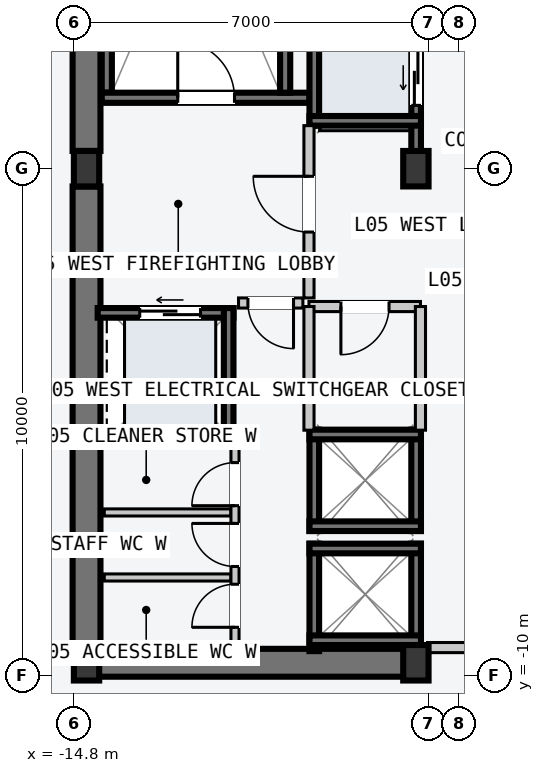
"""IFC4 building model, lengths in metres.
Left out: names, types, materials, properties, quantities, classifications, styles, units other than length and angle.
Written with IfcOpenShell. Run it as: python <this file> out.ifc"""

import sys

from ifc_helpers import new_model, si_unit, direction, frame, frame_2d, origin, origin_2d, place, context, subcontext, project, spatial, rectangle, i_section, extrude, element, fill, save


model = new_model("IFC4")
c1 = context("Model", 3, precision=1e-05, world=origin(), true_north=direction((0.0, 1.0)))
c2 = subcontext(c1, "Body", "Model", "MODEL_VIEW")
j1 = project(units=[si_unit("LENGTHUNIT", "METRE"), si_unit("PLANEANGLEUNIT", "RADIAN")], contexts=[c1])
p1 = place(None, origin())
s1 = spatial("IfcSite", under=j1, at=p1, CompositionType="ELEMENT")
p2 = place(p1, origin())
s2 = spatial("IfcBuilding", under=s1, at=p2, CompositionType="ELEMENT")
p3 = place(p2, frame((0.0, 0.0, 24.0)))
s3 = spatial("IfcBuildingStorey", under=s2, at=p3, CompositionType="ELEMENT", Elevation=24.0)
p4 = place(p3, frame((-14.53, -9.75, -0.2), z_axis=(0.0, 0.0, 1.0), x_axis=(1.0, 0.0, 0.0)))
e1 = element("IfcWall", 1, at=p4, inside=s3, PredefinedType="SHEAR", context=c2, shape_type="SweptSolid", body=[
    extrude(rectangle(XDim=6.46, YDim=0.55, at=frame_2d((3.23, 0.0))), origin(), (0.0, 0.0, 1.0), 3.6),
])
for number, where, z_axis, x_axis in (
    (2, (-14.55, -9.4, -0.2), (0.0, 0.0, 1.0), (0.0, 1.0, 0.0)),
    (3, (-14.55, 0.35, -0.2), (0.0, 0.0, 1.0), (0.0, 1.0, 0.0)),
):
    element("IfcWall", number, at=place(p3, frame(where, z_axis=z_axis, x_axis=x_axis)), inside=s3, PredefinedType="SHEAR", context=c2, shape_type="SweptSolid", body=[
        extrude(rectangle(XDim=9.05, YDim=0.55, at=frame_2d((4.525, 0.0))), origin(), (0.0, 0.0, 1.0), 3.6),
    ])
p5 = place(p3, frame((-14.15, 1.5, -0.2), z_axis=(0.0, 0.0, 1.0), x_axis=(0.0, 1.0, 0.0)))
e4 = element("IfcWall", 4, at=p5, inside=s3, PredefinedType="SOLIDWALL", context=c2, shape_type="SweptSolid", body=[
    extrude(rectangle(XDim=7.8, YDim=0.2, at=frame_2d((3.9, 0.0))), origin(), (0.0, 0.0, 1.0), 3.6),
])
p6 = place(p3, frame((-14.25, 1.4, -0.2), z_axis=(0.0, 0.0, 1.0), x_axis=(1.0, 0.0, 0.0)))
e5 = element("IfcWall", 5, at=p6, inside=s3, PredefinedType="SOLIDWALL", context=c2, shape_type="SweptSolid", body=[
    extrude(rectangle(XDim=4.1, YDim=0.2, at=frame_2d((2.05, 0.0))), origin(), (0.0, 0.0, 1.0), 3.6),
])
p7 = place(p6, frame((1.5, 0.0, 0.2)))
e6 = element("IfcOpeningElement", 6, at=p7, cuts=e5, PredefinedType="OPENING", context=c2, shape_type="SweptSolid", body=[
    extrude(rectangle(XDim=1.12, YDim=2.18, at=frame_2d((0.56, 1.09))), frame((0.0, 0.11, 0.0), z_axis=(0.0, -1.0, 0.0), x_axis=(1.0, 0.0, 0.0)), (0.0, 0.0, 1.0), 0.22),
])
p8 = place(p3, frame((-10.63, 1.5, -0.2), z_axis=(0.0, 0.0, 1.0), x_axis=(0.0, 1.0, 0.0)))
e7 = element("IfcWall", 7, at=p8, inside=s3, PredefinedType="SOLIDWALL", context=c2, shape_type="SweptSolid", body=[
    extrude(rectangle(XDim=7.8, YDim=0.2, at=frame_2d((3.9, 0.0))), origin(), (0.0, 0.0, 1.0), 3.6),
])
for number, where, z_axis, x_axis in (
    (8, (-14.55, -9.75, 0.0), (0.0, 0.0, 1.0), (1.0, 0.0, 0.0)),
    (9, (-14.55, 0.0, 0.0), (0.0, 0.0, 1.0), (1.0, 0.0, 0.0)),
    (10, (-8.05, -9.75, 0.0), (0.0, 0.0, 1.0), (1.0, 0.0, 0.0)),
    (11, (-8.05, 0.0, 0.0), (0.0, 0.0, 1.0), (1.0, 0.0, 0.0)),
):
    element("IfcColumn", number, at=place(p3, frame(where, z_axis=z_axis, x_axis=x_axis)), inside=s3, PredefinedType="COLUMN", context=c2, shape_type="SweptSolid", body=[
        extrude(i_section(OverallWidth=0.5, OverallDepth=0.7, WebThickness=0.028, FlangeThickness=0.045, at=origin_2d()), origin(), (0.0, 0.0, 1.0), 3.6),
    ])
p9 = place(p3, frame((-8.045, 0.21, -0.2), z_axis=(0.0, 0.0, 1.0), x_axis=(0.0, 1.0, 0.0)))
e12 = element("IfcWall", 12, at=p9, inside=s3, PredefinedType="SOLIDWALL", context=c2, shape_type="SweptSolid", body=[
    extrude(rectangle(XDim=2.54, YDim=0.19, at=frame_2d((1.27, 0.0))), origin(), (0.0, 0.0, 1.0), 3.6),
])
p10 = place(p9, frame((1.04, 0.0, 0.2)))
e13 = element("IfcOpeningElement", 13, at=p10, cuts=e12, PredefinedType="OPENING", context=c2, shape_type="SweptSolid", body=[
    extrude(rectangle(XDim=1.1, YDim=2.2, at=frame_2d((0.55, 1.1))), frame((0.0, 0.105, 0.0), z_axis=(0.0, -1.0, 0.0), x_axis=(1.0, 0.0, 0.0)), (0.0, 0.0, 1.0), 0.21),
])
p11 = place(p3, frame((-10.055, 0.85, -0.2), z_axis=(0.0, 0.0, 1.0), x_axis=(0.0, 1.0, 0.0)))
e14 = element("IfcWall", 14, at=p11, inside=s3, PredefinedType="SOLIDWALL", context=c2, shape_type="SweptSolid", body=[
    extrude(rectangle(XDim=1.9, YDim=0.19, at=frame_2d((0.95, 0.0))), origin(), (0.0, 0.0, 1.0), 3.6),
])
p12 = place(p3, frame((-10.15, 0.945, -0.2), z_axis=(0.0, 0.0, 1.0), x_axis=(1.0, 0.0, 0.0)))
e15 = element("IfcWall", 15, at=p12, inside=s3, PredefinedType="SOLIDWALL", context=c2, shape_type="SweptSolid", body=[
    extrude(rectangle(XDim=2.2, YDim=0.19, at=frame_2d((1.1, 0.0))), origin(), (0.0, 0.0, 1.0), 3.6),
])
for number, where, z_axis, x_axis in (
    (16, (-8.045, -9.52, -0.2), (0.0, 0.0, 1.0), (0.0, 1.0, 0.0)),
    (17, (-10.055, -9.52, -0.2), (0.0, 0.0, 1.0), (0.0, 1.0, 0.0)),
):
    element("IfcWall", number, at=place(p3, frame(where, z_axis=z_axis, x_axis=x_axis)), inside=s3, PredefinedType="SOLIDWALL", context=c2, shape_type="SweptSolid", body=[
        extrude(rectangle(XDim=2.12, YDim=0.19, at=frame_2d((1.06, 0.0))), origin(), (0.0, 0.0, 1.0), 3.6),
    ])
for number, where, z_axis, x_axis in (
    (18, (-10.15, -7.495, -0.2), (0.0, 0.0, 1.0), (1.0, 0.0, 0.0)),
    (19, (-10.15, -9.305, -0.2), (0.0, 0.0, 1.0), (1.0, 0.0, 0.0)),
):
    element("IfcWall", number, at=place(p3, frame(where, z_axis=z_axis, x_axis=x_axis)), inside=s3, PredefinedType="SOLIDWALL", context=c2, shape_type="SweptSolid", body=[
        extrude(rectangle(XDim=2.2, YDim=0.19, at=frame_2d((1.1, 0.0))), origin(), (0.0, 0.0, 1.0), 3.6),
    ])
for number, where, z_axis, x_axis in (
    (20, (-8.045, -7.15, -0.2), (0.0, 0.0, 1.0), (0.0, 1.0, 0.0)),
    (21, (-10.055, -7.15, -0.2), (0.0, 0.0, 1.0), (0.0, 1.0, 0.0)),
):
    element("IfcWall", number, at=place(p3, frame(where, z_axis=z_axis, x_axis=x_axis)), inside=s3, PredefinedType="SOLIDWALL", context=c2, shape_type="SweptSolid", body=[
        extrude(rectangle(XDim=2.0, YDim=0.19, at=frame_2d((1.0, 0.0))), origin(), (0.0, 0.0, 1.0), 3.6),
    ])
for number, where, z_axis, x_axis in (
    (22, (-10.15, -5.245, -0.2), (0.0, 0.0, 1.0), (1.0, 0.0, 0.0)),
    (23, (-10.15, -7.055, -0.2), (0.0, 0.0, 1.0), (1.0, 0.0, 0.0)),
):
    element("IfcWall", number, at=place(p3, frame(where, z_axis=z_axis, x_axis=x_axis)), inside=s3, PredefinedType="SOLIDWALL", context=c2, shape_type="SweptSolid", body=[
        extrude(rectangle(XDim=2.2, YDim=0.19, at=frame_2d((1.1, 0.0))), origin(), (0.0, 0.0, 1.0), 3.6),
    ])
p13 = place(p3, frame((-14.33, -2.845, -0.2), z_axis=(0.0, 0.0, 1.0), x_axis=(1.0, 0.0, 0.0)))
e24 = element("IfcWall", 24, at=p13, inside=s3, PredefinedType="SOLIDWALL", context=c2, shape_type="SweptSolid", body=[
    extrude(rectangle(XDim=2.68, YDim=0.19, at=frame_2d((1.34, 0.0))), origin(), (0.0, 0.0, 1.0), 3.6),
])
p14 = place(p13, frame((0.83, 0.0, 0.2)))
e25 = element("IfcOpeningElement", 25, at=p14, cuts=e24, PredefinedType="OPENING", context=c2, shape_type="SweptSolid", body=[
    extrude(rectangle(XDim=1.2, YDim=2.2, at=frame_2d((0.6, 1.1))), frame((0.0, 0.105, 0.0), z_axis=(0.0, -1.0, 0.0), x_axis=(1.0, 0.0, 0.0)), (0.0, 0.0, 1.0), 0.21),
])
p15 = place(p3, frame((-14.33, -5.255, -0.2), z_axis=(0.0, 0.0, 1.0), x_axis=(1.0, 0.0, 0.0)))
e26 = element("IfcWall", 26, at=p15, inside=s3, PredefinedType="SOLIDWALL", context=c2, shape_type="SweptSolid", body=[
    extrude(rectangle(XDim=2.68, YDim=0.19, at=frame_2d((1.34, 0.0))), origin(), (0.0, 0.0, 1.0), 3.6),
])
p16 = place(p3, frame((-11.745, -5.35, -0.2), z_axis=(0.0, 0.0, 1.0), x_axis=(0.0, 1.0, 0.0)))
e27 = element("IfcWall", 27, at=p16, inside=s3, PredefinedType="SOLIDWALL", context=c2, shape_type="SweptSolid", body=[
    extrude(rectangle(XDim=2.6, YDim=0.19, at=frame_2d((1.3, 0.0))), origin(), (0.0, 0.0, 1.0), 3.6),
])
p17 = place(p3, frame((-6.02, -9.45, 0.0), z_axis=(0.0, 0.0, 1.0), x_axis=(-1.0, 0.0, 0.0)))
e28 = element("IfcWall", 28, at=p17, inside=s3, PredefinedType="PARTITIONING", context=c2, shape_type="SweptSolid", body=[
    extrude(rectangle(XDim=1.8, YDim=0.2, at=frame_2d((0.9, 0.0))), origin(), (0.0, 0.0, 1.0), 3.4),
])
p18 = place(p3, frame((-10.16, -2.55, 0.0), z_axis=(0.0, 0.0, 1.0), x_axis=(0.0, 1.0, 0.0)))
e29 = element("IfcWall", 29, at=p18, inside=s3, PredefinedType="PARTITIONING", context=c2, shape_type="SweptSolid", body=[
    extrude(rectangle(XDim=3.4, YDim=0.2, at=frame_2d((1.7, 0.0))), origin(), (0.0, 0.0, 1.0), 3.4),
])
p19 = place(p18, frame((1.3, 0.0, 0.0)))
e30 = element("IfcOpeningElement", 30, at=p19, cuts=e29, PredefinedType="OPENING", context=c2, shape_type="SweptSolid", body=[
    extrude(rectangle(XDim=1.1, YDim=2.15, at=frame_2d((0.55, 1.075))), frame((0.0, 0.11, 0.0), z_axis=(0.0, -1.0, 0.0), x_axis=(1.0, 0.0, 0.0)), (0.0, 0.0, 1.0), 0.22),
])
p20 = place(p3, frame((-10.28, -2.65, 0.0), z_axis=(0.0, 0.0, 1.0), x_axis=(-1.0, 0.0, 0.0)))
e31 = element("IfcWall", 31, at=p20, inside=s3, PredefinedType="PARTITIONING", context=c2, shape_type="SweptSolid", body=[
    extrude(rectangle(XDim=1.27, YDim=0.2, at=frame_2d((0.635, 0.0))), origin(), (0.0, 0.0, 1.0), 3.4),
])
p21 = place(p20, frame((0.185, 0.0, 0.0)))
e32 = element("IfcOpeningElement", 32, at=p21, cuts=e31, PredefinedType="OPENING", context=c2, shape_type="SweptSolid", body=[
    extrude(rectangle(XDim=0.9, YDim=2.15, at=frame_2d((0.45, 1.075))), frame((0.0, 0.11, 0.0), z_axis=(0.0, -1.0, 0.0), x_axis=(1.0, 0.0, 0.0)), (0.0, 0.0, 1.0), 0.22),
])
p22 = place(p3, frame((-7.96, -2.72, 0.0), z_axis=(0.0, 0.0, 1.0), x_axis=(-1.0, 0.0, 0.0)))
e33 = element("IfcWall", 33, at=p22, inside=s3, PredefinedType="PARTITIONING", context=c2, shape_type="SweptSolid", body=[
    extrude(rectangle(XDim=2.2, YDim=0.2, at=frame_2d((1.1, 0.0))), origin(), (0.0, 0.0, 1.0), 3.4),
])
p23 = place(p22, frame((0.62, 0.0, 0.0)))
e34 = element("IfcOpeningElement", 34, at=p23, cuts=e33, PredefinedType="OPENING", context=c2, shape_type="SweptSolid", body=[
    extrude(rectangle(XDim=0.95, YDim=2.1, at=frame_2d((0.475, 1.05))), frame((0.0, 0.11, 0.0), z_axis=(0.0, -1.0, 0.0), x_axis=(1.0, 0.0, 0.0)), (0.0, 0.0, 1.0), 0.22),
])
for number, where, z_axis, x_axis in (
    (35, (-7.96, -5.16, 0.0), (0.0, 0.0, 1.0), (0.0, 1.0, 0.0)),
    (36, (-10.16, -5.16, 0.0), (0.0, 0.0, 1.0), (0.0, 1.0, 0.0)),
):
    element("IfcWall", number, at=place(p3, frame(where, z_axis=z_axis, x_axis=x_axis)), inside=s3, PredefinedType="PARTITIONING", context=c2, shape_type="SweptSolid", body=[
        extrude(rectangle(XDim=2.44, YDim=0.2, at=frame_2d((1.22, 0.0))), origin(), (0.0, 0.0, 1.0), 3.4),
    ])
for number, where, z_axis, x_axis in (
    (37, (-11.7, -8.067, 0.0), (0.0, 0.0, 1.0), (-1.0, 0.0, 0.0)),
    (38, (-11.7, -6.783, 0.0), (0.0, 0.0, 1.0), (-1.0, 0.0, 0.0)),
):
    element("IfcWall", number, at=place(p3, frame(where, z_axis=z_axis, x_axis=x_axis)), inside=s3, PredefinedType="PARTITIONING", context=c2, shape_type="SweptSolid", body=[
        extrude(rectangle(XDim=2.5, YDim=0.14, at=frame_2d((1.25, 0.0))), origin(), (0.0, 0.0, 1.0), 3.4),
    ])
p24 = place(p3, frame((-11.62, -9.35, 0.0), z_axis=(0.0, 0.0, 1.0), x_axis=(0.0, 1.0, 0.0)))
e39 = element("IfcWall", 39, at=p24, inside=s3, PredefinedType="PARTITIONING", context=c2, shape_type="SweptSolid", body=[
    extrude(rectangle(XDim=3.85, YDim=0.16, at=frame_2d((1.925, 0.0))), origin(), (0.0, 0.0, 1.0), 3.4),
])
p25 = place(p24, frame((0.3, 0.0, 0.0)))
e40 = element("IfcOpeningElement", 40, at=p25, cuts=e39, PredefinedType="OPENING", context=c2, shape_type="SweptSolid", body=[
    extrude(rectangle(XDim=0.85, YDim=2.12, at=frame_2d((0.425, 1.06))), frame((0.0, 0.09, 0.0), z_axis=(0.0, -1.0, 0.0), x_axis=(1.0, 0.0, 0.0)), (0.0, 0.0, 1.0), 0.18),
])
p26 = place(p24, frame((1.5, 0.0, 0.0)))
e41 = element("IfcOpeningElement", 41, at=p26, cuts=e39, PredefinedType="OPENING", context=c2, shape_type="SweptSolid", body=[
    extrude(rectangle(XDim=0.85, YDim=2.12, at=frame_2d((0.425, 1.06))), frame((0.0, 0.09, 0.0), z_axis=(0.0, -1.0, 0.0), x_axis=(1.0, 0.0, 0.0)), (0.0, 0.0, 1.0), 0.18),
])
p27 = place(p24, frame((2.7, 0.0, 0.0)))
e42 = element("IfcOpeningElement", 42, at=p27, cuts=e39, PredefinedType="OPENING", context=c2, shape_type="SweptSolid", body=[
    extrude(rectangle(XDim=0.85, YDim=2.12, at=frame_2d((0.425, 1.06))), frame((0.0, 0.09, 0.0), z_axis=(0.0, -1.0, 0.0), x_axis=(1.0, 0.0, 0.0)), (0.0, 0.0, 1.0), 0.18),
])
p28 = place(p7, origin())
e43 = element("IfcDoor", 43, at=p28, inside=s3, OperationType="SINGLE_SWING_LEFT", PredefinedType="DOOR", context=c2, shape_type="SweptSolid", body=[
    extrude(rectangle(XDim=1.12, YDim=2.18, at=frame_2d((0.56, 1.09))), frame((0.0, 0.025, 0.0), z_axis=(0.0, -1.0, 0.0), x_axis=(1.0, 0.0, 0.0)), (0.0, 0.0, 1.0), 0.05),
])
fill(e6, e43)
p29 = place(p10, origin())
e44 = element("IfcDoor", 44, at=p29, inside=s3, OperationType="SLIDING_TO_LEFT", PredefinedType="DOOR", context=c2, shape_type="SweptSolid", body=[
    extrude(rectangle(XDim=1.1, YDim=2.2, at=frame_2d((0.55, 1.1))), frame((0.0, 0.025, 0.0), z_axis=(0.0, -1.0, 0.0), x_axis=(1.0, 0.0, 0.0)), (0.0, 0.0, 1.0), 0.05),
])
fill(e13, e44)
p30 = place(p14, origin())
e45 = element("IfcDoor", 45, at=p30, inside=s3, OperationType="SLIDING_TO_LEFT", PredefinedType="DOOR", context=c2, shape_type="SweptSolid", body=[
    extrude(rectangle(XDim=1.2, YDim=2.2, at=frame_2d((0.6, 1.1))), frame((0.0, 0.025, 0.0), z_axis=(0.0, -1.0, 0.0), x_axis=(1.0, 0.0, 0.0)), (0.0, 0.0, 1.0), 0.05),
])
fill(e25, e45)
p31 = place(p19, origin())
e46 = element("IfcDoor", 46, at=p31, inside=s3, OperationType="SINGLE_SWING_RIGHT", PredefinedType="DOOR", context=c2, shape_type="SweptSolid", body=[
    extrude(rectangle(XDim=1.1, YDim=2.15, at=frame_2d((0.55, 1.075))), frame((0.0, 0.025, 0.0), z_axis=(0.0, -1.0, 0.0), x_axis=(1.0, 0.0, 0.0)), (0.0, 0.0, 1.0), 0.05),
])
fill(e30, e46)
p32 = place(p21, origin())
e47 = element("IfcDoor", 47, at=p32, inside=s3, OperationType="SINGLE_SWING_LEFT", PredefinedType="DOOR", context=c2, shape_type="SweptSolid", body=[
    extrude(rectangle(XDim=0.9, YDim=2.15, at=frame_2d((0.45, 1.075))), frame((0.0, 0.025, 0.0), z_axis=(0.0, -1.0, 0.0), x_axis=(1.0, 0.0, 0.0)), (0.0, 0.0, 1.0), 0.05),
])
fill(e32, e47)
p33 = place(p23, origin())
e48 = element("IfcDoor", 48, at=p33, inside=s3, OperationType="SINGLE_SWING_RIGHT", PredefinedType="DOOR", context=c2, shape_type="SweptSolid", body=[
    extrude(rectangle(XDim=0.95, YDim=2.1, at=frame_2d((0.475, 1.05))), frame((0.0, 0.025, 0.0), z_axis=(0.0, -1.0, 0.0), x_axis=(1.0, 0.0, 0.0)), (0.0, 0.0, 1.0), 0.05),
])
fill(e34, e48)
p34 = place(p25, origin())
e49 = element("IfcDoor", 49, at=p34, inside=s3, OperationType="SINGLE_SWING_LEFT", PredefinedType="DOOR", context=c2, shape_type="SweptSolid", body=[
    extrude(rectangle(XDim=0.85, YDim=2.12, at=frame_2d((0.425, 1.06))), frame((0.0, 0.025, 0.0), z_axis=(0.0, -1.0, 0.0), x_axis=(1.0, 0.0, 0.0)), (0.0, 0.0, 1.0), 0.05),
])
fill(e40, e49)
p35 = place(p26, origin())
e50 = element("IfcDoor", 50, at=p35, inside=s3, OperationType="SINGLE_SWING_RIGHT", PredefinedType="DOOR", context=c2, shape_type="SweptSolid", body=[
    extrude(rectangle(XDim=0.85, YDim=2.12, at=frame_2d((0.425, 1.06))), frame((0.0, 0.025, 0.0), z_axis=(0.0, -1.0, 0.0), x_axis=(1.0, 0.0, 0.0)), (0.0, 0.0, 1.0), 0.05),
])
fill(e41, e50)
p36 = place(p27, origin())
e51 = element("IfcDoor", 51, at=p36, inside=s3, OperationType="SINGLE_SWING_LEFT", PredefinedType="DOOR", context=c2, shape_type="SweptSolid", body=[
    extrude(rectangle(XDim=0.85, YDim=2.12, at=frame_2d((0.425, 1.06))), frame((0.0, 0.025, 0.0), z_axis=(0.0, -1.0, 0.0), x_axis=(1.0, 0.0, 0.0)), (0.0, 0.0, 1.0), 0.05),
])
fill(e42, e51)
save(model, sys.argv[1])
